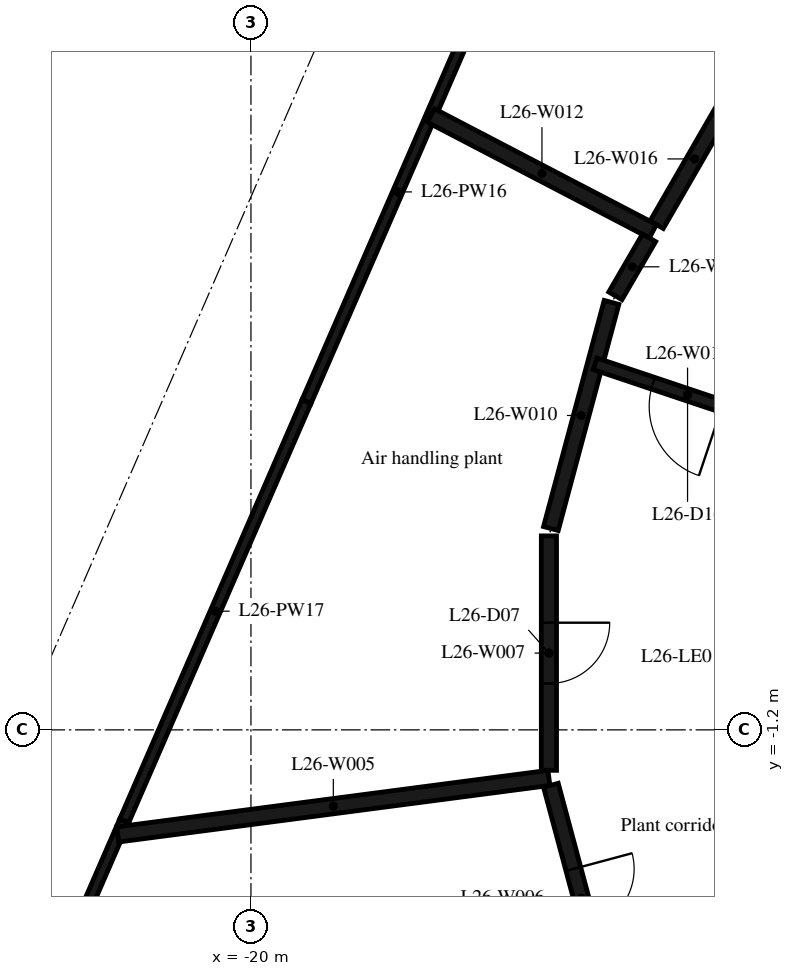
"""IFC4 building model, lengths in metres.
Left out: names, types, materials, properties, quantities, classifications, styles, units other than length and angle.
Written with IfcOpenShell. Run it as: python <this file> out.ifc"""

import sys

from ifc_helpers import new_model, si_unit, direction, frame, frame_2d, origin, place, context, subcontext, project, spatial, rectangle, extrude, element, fill, save


model = new_model("IFC4")
c1 = context("Model", 3, precision=1e-05, world=origin(), true_north=direction((0.0, 1.0)))
c2 = subcontext(c1, "Body", "Model", "MODEL_VIEW")
j1 = project(units=[si_unit("LENGTHUNIT", "METRE"), si_unit("PLANEANGLEUNIT", "RADIAN")], contexts=[c1])
p1 = place(None, origin())
s1 = spatial("IfcSite", under=j1, at=p1, CompositionType="ELEMENT")
p2 = place(p1, origin())
s2 = spatial("IfcBuilding", under=s1, at=p2, CompositionType="ELEMENT")
p3 = place(p2, frame((0.0, 0.0, 108.2)))
s3 = spatial("IfcBuildingStorey", under=s2, at=p3, CompositionType="ELEMENT", Elevation=108.2)
p4 = place(p3, frame((-16.088, 11.095, 0.0), z_axis=(0.0, 0.0, 1.0), x_axis=(-0.398737984544, -0.917064893932, 0.0)))
e1 = element("IfcWall", 1, at=p4, inside=s3, PredefinedType="STANDARD", context=c2, shape_type="SweptSolid", body=[
    extrude(rectangle(XDim=7.519, YDim=0.16, at=frame_2d((3.759, 0.0))), origin(), (0.0, 0.0, 1.0), 4.75),
])
p5 = place(p3, frame((-19.086, 4.199, 0.0), z_axis=(0.0, 0.0, 1.0), x_axis=(-0.398765291981, -0.917053020229, 0.0)))
e2 = element("IfcWall", 2, at=p5, inside=s3, PredefinedType="STANDARD", context=c2, shape_type="SweptSolid", body=[
    extrude(rectangle(XDim=7.519, YDim=0.16, at=frame_2d((3.76, 0.0))), origin(), (0.0, 0.0, 1.0), 4.75),
])
p6 = place(p3, frame((-22.084, -2.696, 0.0), z_axis=(0.0, 0.0, 1.0), x_axis=(-0.398737984544, -0.917064893932, 0.0)))
e3 = element("IfcWall", 3, at=p6, inside=s3, PredefinedType="STANDARD", context=c2, shape_type="SweptSolid", body=[
    extrude(rectangle(XDim=7.519, YDim=0.16, at=frame_2d((3.759, 0.0))), origin(), (0.0, 0.0, 1.0), 4.75),
])
p7 = place(p3, frame((-15.1, -1.99, 0.0), z_axis=(0.0, 0.0, 1.0), x_axis=(-0.991513570941, -0.130003225498, 0.0)))
e4 = element("IfcWall", 4, at=p7, inside=s3, PredefinedType="PARTITIONING", context=c2, shape_type="SweptSolid", body=[
    extrude(rectangle(XDim=7.151, YDim=0.25, at=frame_2d((3.576, 0.0))), origin(), (0.0, 0.0, 1.0), 4.75),
])
p8 = place(p3, frame((-15.068, -2.111, 0.0), z_axis=(0.0, 0.0, 1.0), x_axis=(0.259059323171, -0.965861411942, 0.0)))
e5 = element("IfcWall", 5, at=p8, inside=s3, PredefinedType="PARTITIONING", context=c2, shape_type="SweptSolid", body=[
    extrude(rectangle(XDim=3.851, YDim=0.25, at=frame_2d((1.925, 0.0))), origin(), (0.0, 0.0, 1.0), 4.75),
])
p9 = place(p8, frame((1.425, 0.0, 0.0)))
e6 = element("IfcOpeningElement", 6, at=p9, cuts=e5, PredefinedType="OPENING", context=c2, shape_type="SweptSolid", body=[
    extrude(rectangle(XDim=1.0, YDim=2.1, at=frame_2d((0.5, 1.05))), frame((0.0, 0.135, 0.0), z_axis=(0.0, -1.0, 0.0), x_axis=(1.0, 0.0, 0.0)), (0.0, 0.0, 1.0), 0.27),
])
p10 = place(p3, frame((-15.1, 1.99, 0.0), z_axis=(0.0, 0.0, 1.0), x_axis=(0.0, -1.0, 0.0)))
e7 = element("IfcWall", 7, at=p10, inside=s3, PredefinedType="PARTITIONING", context=c2, shape_type="SweptSolid", body=[
    extrude(rectangle(XDim=3.855, YDim=0.25, at=frame_2d((1.927, 0.0))), origin(), (0.0, 0.0, 1.0), 4.75),
])
p11 = place(p10, frame((1.427, 0.0, 0.0)))
e8 = element("IfcOpeningElement", 8, at=p11, cuts=e7, PredefinedType="OPENING", context=c2, shape_type="SweptSolid", body=[
    extrude(rectangle(XDim=1.0, YDim=2.1, at=frame_2d((0.5, 1.05))), frame((0.0, 0.135, 0.0), z_axis=(0.0, -1.0, 0.0), x_axis=(1.0, 0.0, 0.0)), (0.0, 0.0, 1.0), 0.27),
])
p12 = place(p3, frame((-14.07, 5.83, 0.0), z_axis=(0.0, 0.0, 1.0), x_axis=(-0.259059323171, -0.965861411942, 0.0)))
e9 = element("IfcWall", 9, at=p12, inside=s3, PredefinedType="PARTITIONING", context=c2, shape_type="SweptSolid", body=[
    extrude(rectangle(XDim=3.851, YDim=0.25, at=frame_2d((1.925, 0.0))), origin(), (0.0, 0.0, 1.0), 4.75),
])
p13 = place(p3, frame((-13.39, 7.0, 0.0), z_axis=(0.0, 0.0, 1.0), x_axis=(-0.886668392091, 0.462405841731, 0.0)))
e10 = element("IfcWall", 10, at=p13, inside=s3, PredefinedType="PARTITIONING", context=c2, shape_type="SweptSolid", body=[
    extrude(rectangle(XDim=4.115, YDim=0.25, at=frame_2d((2.058, 0.0))), origin(), (0.0, 0.0, 1.0), 4.75),
])
p14 = place(p3, frame((-13.453, 6.892, 0.0), z_axis=(0.0, 0.0, 1.0), x_axis=(-0.502370413152, -0.864652512857, 0.0)))
e11 = element("IfcWall", 11, at=p14, inside=s3, PredefinedType="PARTITIONING", context=c2, shape_type="SweptSolid", body=[
    extrude(rectangle(XDim=1.103, YDim=0.25, at=frame_2d((0.552, 0.0))), origin(), (0.0, 0.0, 1.0), 4.75),
])
p15 = place(p3, frame((-12.08, 9.27, 0.0), z_axis=(0.0, 0.0, 1.0), x_axis=(-0.499821239653, -0.866128586522, 0.0)))
e12 = element("IfcWall", 12, at=p15, inside=s3, PredefinedType="PARTITIONING", context=c2, shape_type="SweptSolid", body=[
    extrude(rectangle(XDim=2.496, YDim=0.25, at=frame_2d((1.248, 0.0))), origin(), (0.0, 0.0, 1.0), 4.75),
])
p16 = place(p3, frame((-11.3, 3.8, 0.0), z_axis=(0.0, 0.0, 1.0), x_axis=(-0.94805712629, 0.318100118345, 0.0)))
e13 = element("IfcWall", 13, at=p16, inside=s3, PredefinedType="PARTITIONING", context=c2, shape_type="SweptSolid", body=[
    extrude(rectangle(XDim=3.207, YDim=0.2, at=frame_2d((1.603, 0.0))), origin(), (0.0, 0.0, 1.0), 4.75),
])
p17 = place(p16, frame((1.003, 0.0, 0.0)))
e14 = element("IfcOpeningElement", 14, at=p17, cuts=e13, PredefinedType="OPENING", context=c2, shape_type="SweptSolid", body=[
    extrude(rectangle(XDim=1.2, YDim=2.1, at=frame_2d((0.6, 1.05))), frame((0.0, 0.11, 0.0), z_axis=(0.0, -1.0, 0.0), x_axis=(1.0, 0.0, 0.0)), (0.0, 0.0, 1.0), 0.22),
])
p18 = place(p9, origin())
e15 = element("IfcDoor", 15, at=p18, inside=s3, OperationType="SINGLE_SWING_LEFT", PredefinedType="DOOR", context=c2, shape_type="SweptSolid", body=[
    extrude(rectangle(XDim=1.0, YDim=2.1, at=frame_2d((0.5, 1.05))), frame((0.0, 0.025, 0.0), z_axis=(0.0, -1.0, 0.0), x_axis=(1.0, 0.0, 0.0)), (0.0, 0.0, 1.0), 0.05),
])
fill(e6, e15)
p19 = place(p11, origin())
e16 = element("IfcDoor", 16, at=p19, inside=s3, OperationType="SINGLE_SWING_LEFT", PredefinedType="DOOR", context=c2, shape_type="SweptSolid", body=[
    extrude(rectangle(XDim=1.0, YDim=2.1, at=frame_2d((0.5, 1.05))), frame((0.0, 0.025, 0.0), z_axis=(0.0, -1.0, 0.0), x_axis=(1.0, 0.0, 0.0)), (0.0, 0.0, 1.0), 0.05),
])
fill(e8, e16)
p20 = place(p17, origin())
e17 = element("IfcDoor", 17, at=p20, inside=s3, OperationType="SINGLE_SWING_LEFT", PredefinedType="DOOR", context=c2, shape_type="SweptSolid", body=[
    extrude(rectangle(XDim=1.2, YDim=2.1, at=frame_2d((0.6, 1.05))), frame((0.0, 0.025, 0.0), z_axis=(0.0, -1.0, 0.0), x_axis=(1.0, 0.0, 0.0)), (0.0, 0.0, 1.0), 0.05),
])
fill(e14, e17)
save(model, sys.argv[1])
